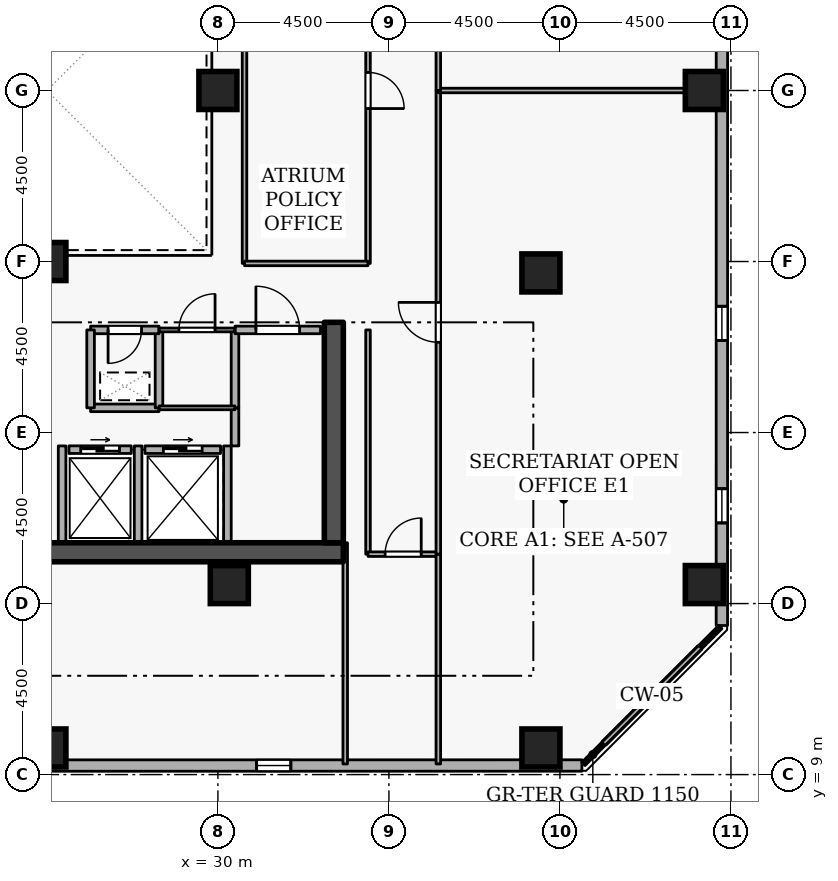
"""IFC4 building model, lengths in metres.
Left out: names, types, materials, properties, quantities, classifications, styles, units other than length and angle.
Written with IfcOpenShell. Run it as: python <this file> out.ifc"""

import sys

from ifc_helpers import new_model, si_unit, direction, frame, frame_2d, origin, origin_2d, place, context, subcontext, project, spatial, rectangle, extrude, element, fill, save


model = new_model("IFC4")
c1 = context("Model", 3, precision=1e-05, world=origin(), true_north=direction((0.0, 1.0)))
c2 = subcontext(c1, "Body", "Model", "MODEL_VIEW")
j1 = project(units=[si_unit("LENGTHUNIT", "METRE"), si_unit("PLANEANGLEUNIT", "RADIAN")], contexts=[c1])
p1 = place(None, origin())
s1 = spatial("IfcSite", under=j1, at=p1, CompositionType="ELEMENT")
p2 = place(p1, origin())
s2 = spatial("IfcBuilding", under=s1, at=p2, CompositionType="ELEMENT")
p3 = place(p2, frame((0.0, 0.0, 207.3)))
s3 = spatial("IfcBuildingStorey", under=s2, at=p3, CompositionType="ELEMENT", Elevation=207.3)
p4 = place(p3, frame((17.7, 14.85, 0.0), z_axis=(0.0, 0.0, 1.0), x_axis=(1.0, 0.0, 0.0)))
e1 = element("IfcWall", 1, at=p4, inside=s3, PredefinedType="SHEAR", context=c2, shape_type="SweptSolid", body=[
    extrude(rectangle(XDim=15.6, YDim=0.5, at=frame_2d((7.8, 0.0))), origin(), (0.0, 0.0, 1.0), 3.6),
])
p5 = place(p3, frame((33.05, 15.1, 0.0), z_axis=(0.0, 0.0, 1.0), x_axis=(0.0, 1.0, 0.0)))
e2 = element("IfcWall", 2, at=p5, inside=s3, PredefinedType="SHEAR", context=c2, shape_type="SweptSolid", body=[
    extrude(rectangle(XDim=5.8, YDim=0.5, at=frame_2d((2.9, 0.0))), origin(), (0.0, 0.0, 1.0), 3.6),
])
for number, where, z_axis, x_axis in (
    (3, (25.5, 9.7, 0.0), (0.0, 0.0, 1.0), (1.0, 0.0, 0.0)),
    (4, (38.5, 9.7, 0.0), (0.0, 0.0, 1.0), (1.0, 0.0, 0.0)),
    (5, (42.8, 14.0, 0.0), (0.0, 0.0, 1.0), (1.0, 0.0, 0.0)),
    (6, (42.8, 27.0, 0.0), (0.0, 0.0, 1.0), (1.0, 0.0, 0.0)),
    (7, (38.5, 22.2, 0.0), (0.0, 0.0, 1.0), (1.0, 0.0, 0.0)),
    (8, (30.3, 14.0, 0.0), (0.0, 0.0, 1.0), (1.0, 0.0, 0.0)),
    (9, (25.5, 22.5, 0.0), (0.0, 0.0, 1.0), (1.0, 0.0, 0.0)),
    (10, (30.0, 27.0, 0.0), (0.0, 0.0, 1.0), (1.0, 0.0, 0.0)),
):
    element("IfcColumn", number, at=place(p3, frame(where, z_axis=z_axis, x_axis=x_axis)), inside=s3, PredefinedType="COLUMN", context=c2, shape_type="SweptSolid", body=[
        extrude(rectangle(XDim=1.0, YDim=1.0, at=origin_2d()), origin(), (0.0, 0.0, 1.0), 3.6),
    ])
p6 = place(p3, frame((4.319, 9.235, 0.0), z_axis=(0.0, 0.0, 1.0), x_axis=(0.999999994606, 0.000103863011, 0.0)))
e11 = element("IfcWall", 11, at=p6, inside=s3, PredefinedType="STANDARD", context=c2, shape_type="SweptSolid", body=[
    extrude(rectangle(XDim=35.259, YDim=0.3, at=frame_2d((17.629, 0.0))), origin(), (0.0, 0.0, 1.0), 2.7),
])
p7 = place(p6, frame((2.7, 0.0, 0.72)))
e12 = element("IfcOpeningElement", 12, at=p7, cuts=e11, PredefinedType="OPENING", context=c2, shape_type="SweptSolid", body=[
    extrude(rectangle(XDim=0.9, YDim=1.75, at=frame_2d((0.45, 0.875))), frame((0.0, 0.16, 0.0), z_axis=(0.0, -1.0, 0.0), x_axis=(1.0, 0.0, 0.0)), (0.0, 0.0, 1.0), 0.32),
])
p8 = place(p6, frame((12.3, 0.0, 0.72)))
e13 = element("IfcOpeningElement", 13, at=p8, cuts=e11, PredefinedType="OPENING", context=c2, shape_type="SweptSolid", body=[
    extrude(rectangle(XDim=0.9, YDim=1.75, at=frame_2d((0.45, 0.875))), frame((0.0, 0.16, 0.0), z_axis=(0.0, -1.0, 0.0), x_axis=(1.0, 0.0, 0.0)), (0.0, 0.0, 1.0), 0.32),
])
p9 = place(p6, frame((17.1, 0.0, 0.72)))
e14 = element("IfcOpeningElement", 14, at=p9, cuts=e11, PredefinedType="OPENING", context=c2, shape_type="SweptSolid", body=[
    extrude(rectangle(XDim=0.9, YDim=1.75, at=frame_2d((0.45, 0.875))), frame((0.0, 0.16, 0.0), z_axis=(0.0, -1.0, 0.0), x_axis=(1.0, 0.0, 0.0)), (0.0, 0.0, 1.0), 0.32),
])
p10 = place(p6, frame((26.7, 0.0, 0.72)))
e15 = element("IfcOpeningElement", 15, at=p10, cuts=e11, PredefinedType="OPENING", context=c2, shape_type="SweptSolid", body=[
    extrude(rectangle(XDim=0.9, YDim=1.75, at=frame_2d((0.45, 0.875))), frame((0.0, 0.16, 0.0), z_axis=(0.0, -1.0, 0.0), x_axis=(1.0, 0.0, 0.0)), (0.0, 0.0, 1.0), 0.32),
])
p11 = place(p3, frame((43.261, 12.922, 0.0), z_axis=(0.0, 0.0, 1.0), x_axis=(0.000103863011, 0.999999994606, 0.0)))
e16 = element("IfcWall", 16, at=p11, inside=s3, PredefinedType="STANDARD", context=c2, shape_type="SweptSolid", body=[
    extrude(rectangle(XDim=35.259, YDim=0.3, at=frame_2d((17.629, 0.0))), origin(), (0.0, 0.0, 1.0), 2.7),
])
p12 = place(p11, frame((2.7, 0.0, 0.72)))
e17 = element("IfcOpeningElement", 17, at=p12, cuts=e16, PredefinedType="OPENING", context=c2, shape_type="SweptSolid", body=[
    extrude(rectangle(XDim=0.9, YDim=1.75, at=frame_2d((0.45, 0.875))), frame((0.0, 0.16, 0.0), z_axis=(0.0, -1.0, 0.0), x_axis=(1.0, 0.0, 0.0)), (0.0, 0.0, 1.0), 0.32),
])
p13 = place(p11, frame((7.5, 0.0, 0.72)))
e18 = element("IfcOpeningElement", 18, at=p13, cuts=e16, PredefinedType="OPENING", context=c2, shape_type="SweptSolid", body=[
    extrude(rectangle(XDim=0.9, YDim=1.75, at=frame_2d((0.45, 0.875))), frame((0.0, 0.16, 0.0), z_axis=(0.0, -1.0, 0.0), x_axis=(1.0, 0.0, 0.0)), (0.0, 0.0, 1.0), 0.32),
])
p14 = place(p11, frame((17.1, 0.0, 0.72)))
e19 = element("IfcOpeningElement", 19, at=p14, cuts=e16, PredefinedType="OPENING", context=c2, shape_type="SweptSolid", body=[
    extrude(rectangle(XDim=0.9, YDim=1.75, at=frame_2d((0.45, 0.875))), frame((0.0, 0.16, 0.0), z_axis=(0.0, -1.0, 0.0), x_axis=(1.0, 0.0, 0.0)), (0.0, 0.0, 1.0), 0.32),
])
p15 = place(p11, frame((21.9, 0.0, 0.72)))
e20 = element("IfcOpeningElement", 20, at=p15, cuts=e16, PredefinedType="OPENING", context=c2, shape_type="SweptSolid", body=[
    extrude(rectangle(XDim=0.9, YDim=1.75, at=frame_2d((0.45, 0.875))), frame((0.0, 0.16, 0.0), z_axis=(0.0, -1.0, 0.0), x_axis=(1.0, 0.0, 0.0)), (0.0, 0.0, 1.0), 0.32),
])
p16 = place(p11, frame((31.5, 0.0, 0.72)))
e21 = element("IfcOpeningElement", 21, at=p16, cuts=e16, PredefinedType="OPENING", context=c2, shape_type="SweptSolid", body=[
    extrude(rectangle(XDim=0.9, YDim=1.75, at=frame_2d((0.45, 0.875))), frame((0.0, 0.16, 0.0), z_axis=(0.0, -1.0, 0.0), x_axis=(1.0, 0.0, 0.0)), (0.0, 0.0, 1.0), 0.32),
])
p17 = place(p3, frame((26.08, 17.55, 0.0), z_axis=(0.0, 0.0, 1.0), x_axis=(1.0, 0.0, 0.0)))
e22 = element("IfcWall", 22, at=p17, inside=s3, PredefinedType="STANDARD", context=c2, shape_type="SweptSolid", body=[
    extrude(rectangle(XDim=1.64, YDim=0.2, at=frame_2d((0.82, 0.0))), origin(), (0.0, 0.0, 1.0), 3.34),
])
p18 = place(p17, frame((0.31, 0.0, 0.0)))
e23 = element("IfcOpeningElement", 23, at=p18, cuts=e22, PredefinedType="OPENING", context=c2, shape_type="SweptSolid", body=[
    extrude(rectangle(XDim=1.02, YDim=2.06, at=frame_2d((0.51, 1.03))), frame((0.0, 0.11, 0.0), z_axis=(0.0, -1.0, 0.0), x_axis=(1.0, 0.0, 0.0)), (0.0, 0.0, 1.0), 0.22),
])
p19 = place(p3, frame((28.08, 17.55, 0.0), z_axis=(0.0, 0.0, 1.0), x_axis=(1.0, 0.0, 0.0)))
e24 = element("IfcWall", 24, at=p19, inside=s3, PredefinedType="STANDARD", context=c2, shape_type="SweptSolid", body=[
    extrude(rectangle(XDim=1.99, YDim=0.2, at=frame_2d((0.995, 0.0))), origin(), (0.0, 0.0, 1.0), 3.34),
])
p20 = place(p19, frame((0.485, 0.0, 0.0)))
e25 = element("IfcOpeningElement", 25, at=p20, cuts=e24, PredefinedType="OPENING", context=c2, shape_type="SweptSolid", body=[
    extrude(rectangle(XDim=1.02, YDim=2.06, at=frame_2d((0.51, 1.03))), frame((0.0, 0.11, 0.0), z_axis=(0.0, -1.0, 0.0), x_axis=(1.0, 0.0, 0.0)), (0.0, 0.0, 1.0), 0.22),
])
for number, where, z_axis, x_axis in (
    (26, (27.9, 15.112, 0.0), (0.0, 0.0, 1.0), (0.0, 1.0, 0.0)),
    (27, (25.9, 15.112, 0.0), (0.0, 0.0, 1.0), (0.0, 1.0, 0.0)),
    (28, (30.25, 15.112, 0.0), (0.0, 0.0, 1.0), (0.0, 1.0, 0.0)),
):
    element("IfcWall", number, at=place(p3, frame(where, z_axis=z_axis, x_axis=x_axis)), inside=s3, PredefinedType="STANDARD", context=c2, shape_type="SweptSolid", body=[
        extrude(rectangle(XDim=2.536, YDim=0.2, at=frame_2d((1.268, 0.0))), origin(), (0.0, 0.0, 1.0), 3.34),
    ])
p21 = place(p3, frame((26.65, 18.65, 0.0), z_axis=(0.0, 0.0, 1.0), x_axis=(1.0, 0.0, 0.0)))
e29 = element("IfcWall", 29, at=p21, inside=s3, PredefinedType="STANDARD", context=c2, shape_type="SweptSolid", body=[
    extrude(rectangle(XDim=1.8, YDim=0.2, at=frame_2d((0.9, 0.0))), origin(), (0.0, 0.0, 1.0), 3.34),
])
p22 = place(p3, frame((28.45, 18.65, 0.0), z_axis=(0.0, 0.0, 1.0), x_axis=(0.0, 1.0, 0.0)))
e30 = element("IfcWall", 30, at=p22, inside=s3, PredefinedType="STANDARD", context=c2, shape_type="SweptSolid", body=[
    extrude(rectangle(XDim=2.05, YDim=0.2, at=frame_2d((1.025, 0.0))), origin(), (0.0, 0.0, 1.0), 3.34),
])
p23 = place(p3, frame((28.45, 20.7, 0.0), z_axis=(0.0, 0.0, 1.0), x_axis=(-1.0, 0.0, 0.0)))
e31 = element("IfcWall", 31, at=p23, inside=s3, PredefinedType="STANDARD", context=c2, shape_type="SweptSolid", body=[
    extrude(rectangle(XDim=1.8, YDim=0.2, at=frame_2d((0.9, 0.0))), origin(), (0.0, 0.0, 1.0), 3.34),
])
p24 = place(p23, frame((0.46, 0.0, 0.0)))
e32 = element("IfcOpeningElement", 32, at=p24, cuts=e31, PredefinedType="OPENING", context=c2, shape_type="SweptSolid", body=[
    extrude(rectangle(XDim=0.88, YDim=2.04, at=frame_2d((0.44, 1.02))), frame((0.0, 0.11, 0.0), z_axis=(0.0, -1.0, 0.0), x_axis=(1.0, 0.0, 0.0)), (0.0, 0.0, 1.0), 0.22),
])
p25 = place(p3, frame((26.65, 20.7, 0.0), z_axis=(0.0, 0.0, 1.0), x_axis=(0.0, -1.0, 0.0)))
e33 = element("IfcWall", 33, at=p25, inside=s3, PredefinedType="STANDARD", context=c2, shape_type="SweptSolid", body=[
    extrude(rectangle(XDim=2.05, YDim=0.2, at=frame_2d((1.025, 0.0))), origin(), (0.0, 0.0, 1.0), 3.34),
])
p26 = place(p3, frame((30.45, 17.648, 0.0), z_axis=(0.0, 0.0, 1.0), x_axis=(0.0, 1.0, 0.0)))
e34 = element("IfcWall", 34, at=p26, inside=s3, PredefinedType="STANDARD", context=c2, shape_type="SweptSolid", body=[
    extrude(rectangle(XDim=1.002, YDim=0.2, at=frame_2d((0.501, 0.0))), origin(), (0.0, 0.0, 1.0), 3.34),
])
p27 = place(p3, frame((30.45, 18.65, 0.0), z_axis=(0.0, 0.0, 1.0), x_axis=(0.0, 1.0, 0.0)))
e35 = element("IfcWall", 35, at=p27, inside=s3, PredefinedType="STANDARD", context=c2, shape_type="SweptSolid", body=[
    extrude(rectangle(XDim=2.05, YDim=0.2, at=frame_2d((1.025, 0.0))), origin(), (0.0, 0.0, 1.0), 3.34),
])
p28 = place(p3, frame((30.45, 20.7, 0.0), z_axis=(0.0, 0.0, 1.0), x_axis=(1.0, 0.0, 0.0)))
e36 = element("IfcWall", 36, at=p28, inside=s3, PredefinedType="STANDARD", context=c2, shape_type="SweptSolid", body=[
    extrude(rectangle(XDim=2.25, YDim=0.2, at=frame_2d((1.125, 0.0))), origin(), (0.0, 0.0, 1.0), 3.34),
])
p29 = place(p28, frame((0.55, 0.0, 0.0)))
e37 = element("IfcOpeningElement", 37, at=p29, cuts=e36, PredefinedType="OPENING", context=c2, shape_type="SweptSolid", body=[
    extrude(rectangle(XDim=1.15, YDim=2.1, at=frame_2d((0.575, 1.05))), frame((0.0, 0.11, 0.0), z_axis=(0.0, -1.0, 0.0), x_axis=(1.0, 0.0, 0.0)), (0.0, 0.0, 1.0), 0.22),
])
p30 = place(p3, frame((30.45, 18.65, 0.0), z_axis=(0.0, 0.0, 1.0), x_axis=(-1.0, 0.0, 0.0)))
e38 = element("IfcWall", 38, at=p30, inside=s3, PredefinedType="PARTITIONING", context=c2, shape_type="SweptSolid", body=[
    extrude(rectangle(XDim=2.0, YDim=0.1, at=frame_2d((1.0, 0.0))), origin(), (0.0, 0.0, 1.0), 3.34),
])
p31 = place(p3, frame((28.45, 20.7, 0.0), z_axis=(0.0, 0.0, 1.0), x_axis=(1.0, 0.0, 0.0)))
e39 = element("IfcWall", 39, at=p31, inside=s3, PredefinedType="PARTITIONING", context=c2, shape_type="SweptSolid", body=[
    extrude(rectangle(XDim=2.0, YDim=0.1, at=frame_2d((1.0, 0.0))), origin(), (0.0, 0.0, 1.0), 3.34),
])
p32 = place(p31, frame((0.525, 0.0, 0.0)))
e40 = element("IfcOpeningElement", 40, at=p32, cuts=e39, PredefinedType="OPENING", context=c2, shape_type="SweptSolid", body=[
    extrude(rectangle(XDim=0.95, YDim=2.1, at=frame_2d((0.475, 1.05))), frame((0.0, 0.06, 0.0), z_axis=(0.0, -1.0, 0.0), x_axis=(1.0, 0.0, 0.0)), (0.0, 0.0, 1.0), 0.12),
])
p33 = place(p3, frame((33.95, 20.7, 0.0), z_axis=(0.0, 0.0, 1.0), x_axis=(0.0, -1.0, 0.0)))
e41 = element("IfcWall", 41, at=p33, inside=s3, PredefinedType="PARTITIONING", context=c2, shape_type="SweptSolid", body=[
    extrude(rectangle(XDim=5.9, YDim=0.12, at=frame_2d((2.95, 0.0))), origin(), (0.0, 0.0, 1.0), 3.34),
])
p34 = place(p3, frame((33.95, 14.8, 0.0), z_axis=(0.0, 0.0, 1.0), x_axis=(1.0, 0.0, 0.0)))
e42 = element("IfcWall", 42, at=p34, inside=s3, PredefinedType="PARTITIONING", context=c2, shape_type="SweptSolid", body=[
    extrude(rectangle(XDim=1.85, YDim=0.12, at=frame_2d((0.925, 0.0))), origin(), (0.0, 0.0, 1.0), 3.34),
])
p35 = place(p34, frame((0.45, 0.0, 0.0)))
e43 = element("IfcOpeningElement", 43, at=p35, cuts=e42, PredefinedType="OPENING", context=c2, shape_type="SweptSolid", body=[
    extrude(rectangle(XDim=0.95, YDim=2.1, at=frame_2d((0.475, 1.05))), frame((0.0, 0.07, 0.0), z_axis=(0.0, -1.0, 0.0), x_axis=(1.0, 0.0, 0.0)), (0.0, 0.0, 1.0), 0.14),
])
p36 = place(p3, frame((35.8, 14.8, 0.0), z_axis=(0.0, 0.0, 1.0), x_axis=(0.0, -1.0, 0.0)))
e44 = element("IfcWall", 44, at=p36, inside=s3, PredefinedType="PARTITIONING", context=c2, shape_type="SweptSolid", body=[
    extrude(rectangle(XDim=5.52, YDim=0.12, at=frame_2d((2.76, 0.0))), origin(), (0.0, 0.0, 1.0), 3.34),
])
p37 = place(p3, frame((33.35, 9.28, 0.0), z_axis=(0.0, 0.0, 1.0), x_axis=(0.0, 1.0, 0.0)))
e45 = element("IfcWall", 45, at=p37, inside=s3, PredefinedType="PARTITIONING", context=c2, shape_type="SweptSolid", body=[
    extrude(rectangle(XDim=5.82, YDim=0.12, at=frame_2d((2.91, 0.0))), origin(), (0.0, 0.0, 1.0), 2.545),
])
p38 = place(p3, frame((35.8, 14.8, 0.0), z_axis=(0.0, 0.0, 1.0), x_axis=(0.0, 1.0, 0.0)))
e46 = element("IfcWall", 46, at=p38, inside=s3, PredefinedType="PARTITIONING", context=c2, shape_type="SweptSolid", body=[
    extrude(rectangle(XDim=12.2, YDim=0.12, at=frame_2d((6.1, 0.0))), origin(), (0.0, 0.0, 1.0), 3.34),
])
p39 = place(p38, frame((5.575, 0.0, 0.0)))
e47 = element("IfcOpeningElement", 47, at=p39, cuts=e46, PredefinedType="OPENING", context=c2, shape_type="SweptSolid", body=[
    extrude(rectangle(XDim=1.05, YDim=2.1, at=frame_2d((0.525, 1.05))), frame((0.0, 0.07, 0.0), z_axis=(0.0, -1.0, 0.0), x_axis=(1.0, 0.0, 0.0)), (0.0, 0.0, 1.0), 0.14),
])
p40 = place(p3, frame((35.8, 27.0, 0.0), z_axis=(0.0, 0.0, 1.0), x_axis=(1.0, 0.0, 0.0)))
e48 = element("IfcWall", 48, at=p40, inside=s3, PredefinedType="PARTITIONING", context=c2, shape_type="SweptSolid", body=[
    extrude(rectangle(XDim=7.42, YDim=0.12, at=frame_2d((3.71, 0.0))), origin(), (0.0, 0.0, 1.0), 2.932),
])
p41 = place(p3, frame((43.22, 12.883, 0.0), z_axis=(0.0, 0.0, 1.0), x_axis=(-0.707106781187, -0.707106781187, 0.0)))
e49 = element("IfcWall", 49, at=p41, inside=s3, PredefinedType="PARTITIONING", context=c2, shape_type="SweptSolid", body=[
    extrude(rectangle(XDim=5.095, YDim=0.12, at=frame_2d((2.547, 0.0))), origin(), (0.0, 0.0, 1.0), 3.34),
])
p42 = place(p3, frame((35.8, 27.0, 0.0), z_axis=(0.0, 0.0, 1.0), x_axis=(0.0, 1.0, 0.0)))
e50 = element("IfcWall", 50, at=p42, inside=s3, PredefinedType="PARTITIONING", context=c2, shape_type="SweptSolid", body=[
    extrude(rectangle(XDim=6.3, YDim=0.12, at=frame_2d((3.15, 0.0))), origin(), (0.0, 0.0, 1.0), 3.34),
])
p43 = place(p42, frame((2.625, 0.0, 0.0)))
e51 = element("IfcOpeningElement", 51, at=p43, cuts=e50, PredefinedType="OPENING", context=c2, shape_type="SweptSolid", body=[
    extrude(rectangle(XDim=1.05, YDim=2.1, at=frame_2d((0.525, 1.05))), frame((0.0, 0.07, 0.0), z_axis=(0.0, -1.0, 0.0), x_axis=(1.0, 0.0, 0.0)), (0.0, 0.0, 1.0), 0.14),
])
p44 = place(p3, frame((30.7, 22.45, 0.0), z_axis=(0.0, 0.0, 1.0), x_axis=(0.0, 1.0, 0.0)))
e52 = element("IfcWall", 52, at=p44, inside=s3, PredefinedType="PARTITIONING", context=c2, shape_type="SweptSolid", body=[
    extrude(rectangle(XDim=9.1, YDim=0.12, at=frame_2d((4.55, 0.0))), origin(), (0.0, 0.0, 1.0), 3.34),
])
p45 = place(p3, frame((33.95, 31.55, 0.0), z_axis=(0.0, 0.0, 1.0), x_axis=(0.0, -1.0, 0.0)))
e53 = element("IfcWall", 53, at=p45, inside=s3, PredefinedType="PARTITIONING", context=c2, shape_type="SweptSolid", body=[
    extrude(rectangle(XDim=9.1, YDim=0.12, at=frame_2d((4.55, 0.0))), origin(), (0.0, 0.0, 1.0), 3.34),
])
p46 = place(p45, frame((4.075, 0.0, 0.0)))
e54 = element("IfcOpeningElement", 54, at=p46, cuts=e53, PredefinedType="OPENING", context=c2, shape_type="SweptSolid", body=[
    extrude(rectangle(XDim=0.95, YDim=2.1, at=frame_2d((0.475, 1.05))), frame((0.0, 0.07, 0.0), z_axis=(0.0, -1.0, 0.0), x_axis=(1.0, 0.0, 0.0)), (0.0, 0.0, 1.0), 0.14),
])
p47 = place(p3, frame((33.95, 22.45, 0.0), z_axis=(0.0, 0.0, 1.0), x_axis=(-1.0, 0.0, 0.0)))
e55 = element("IfcWall", 55, at=p47, inside=s3, PredefinedType="PARTITIONING", context=c2, shape_type="SweptSolid", body=[
    extrude(rectangle(XDim=3.25, YDim=0.12, at=frame_2d((1.625, 0.0))), origin(), (0.0, 0.0, 1.0), 3.34),
])
p48 = place(p10, origin())
e56 = element("IfcWindow", 56, at=p48, inside=s3, PartitioningType="SINGLE_PANEL", PredefinedType="WINDOW", context=c2, shape_type="SweptSolid", body=[
    extrude(rectangle(XDim=0.9, YDim=1.75, at=frame_2d((0.45, 0.875))), frame((0.0, 0.03, 0.0), z_axis=(0.0, -1.0, 0.0), x_axis=(1.0, 0.0, 0.0)), (0.0, 0.0, 1.0), 0.06),
])
fill(e15, e56)
p49 = place(p12, origin())
e57 = element("IfcWindow", 57, at=p49, inside=s3, PartitioningType="SINGLE_PANEL", PredefinedType="WINDOW", context=c2, shape_type="SweptSolid", body=[
    extrude(rectangle(XDim=0.9, YDim=1.75, at=frame_2d((0.45, 0.875))), frame((0.0, 0.03, 0.0), z_axis=(0.0, -1.0, 0.0), x_axis=(1.0, 0.0, 0.0)), (0.0, 0.0, 1.0), 0.06),
])
fill(e17, e57)
p50 = place(p13, origin())
e58 = element("IfcWindow", 58, at=p50, inside=s3, PartitioningType="SINGLE_PANEL", PredefinedType="WINDOW", context=c2, shape_type="SweptSolid", body=[
    extrude(rectangle(XDim=0.9, YDim=1.75, at=frame_2d((0.45, 0.875))), frame((0.0, 0.03, 0.0), z_axis=(0.0, -1.0, 0.0), x_axis=(1.0, 0.0, 0.0)), (0.0, 0.0, 1.0), 0.06),
])
fill(e18, e58)
p51 = place(p18, origin())
e59 = element("IfcDoor", 59, at=p51, inside=s3, OperationType="SLIDING_TO_LEFT", PredefinedType="DOOR", context=c2, shape_type="SweptSolid", body=[
    extrude(rectangle(XDim=1.02, YDim=2.06, at=frame_2d((0.51, 1.03))), frame((0.0, 0.025, 0.0), z_axis=(0.0, -1.0, 0.0), x_axis=(1.0, 0.0, 0.0)), (0.0, 0.0, 1.0), 0.05),
])
fill(e23, e59)
p52 = place(p20, origin())
e60 = element("IfcDoor", 60, at=p52, inside=s3, OperationType="SLIDING_TO_LEFT", PredefinedType="DOOR", context=c2, shape_type="SweptSolid", body=[
    extrude(rectangle(XDim=1.02, YDim=2.06, at=frame_2d((0.51, 1.03))), frame((0.0, 0.025, 0.0), z_axis=(0.0, -1.0, 0.0), x_axis=(1.0, 0.0, 0.0)), (0.0, 0.0, 1.0), 0.05),
])
fill(e25, e60)
p53 = place(p24, origin())
e61 = element("IfcDoor", 61, at=p53, inside=s3, OperationType="SINGLE_SWING_RIGHT", PredefinedType="DOOR", context=c2, shape_type="SweptSolid", body=[
    extrude(rectangle(XDim=0.88, YDim=2.04, at=frame_2d((0.44, 1.02))), frame((0.0, 0.025, 0.0), z_axis=(0.0, -1.0, 0.0), x_axis=(1.0, 0.0, 0.0)), (0.0, 0.0, 1.0), 0.05),
])
fill(e32, e61)
p54 = place(p32, origin())
e62 = element("IfcDoor", 62, at=p54, inside=s3, OperationType="SINGLE_SWING_RIGHT", PredefinedType="DOOR", context=c2, shape_type="SweptSolid", body=[
    extrude(rectangle(XDim=0.95, YDim=2.1, at=frame_2d((0.475, 1.05))), frame((0.0, 0.025, 0.0), z_axis=(0.0, -1.0, 0.0), x_axis=(1.0, 0.0, 0.0)), (0.0, 0.0, 1.0), 0.05),
])
fill(e40, e62)
p55 = place(p29, origin())
e63 = element("IfcDoor", 63, at=p55, inside=s3, OperationType="SINGLE_SWING_LEFT", PredefinedType="DOOR", context=c2, shape_type="SweptSolid", body=[
    extrude(rectangle(XDim=1.15, YDim=2.1, at=frame_2d((0.575, 1.05))), frame((0.0, 0.025, 0.0), z_axis=(0.0, -1.0, 0.0), x_axis=(1.0, 0.0, 0.0)), (0.0, 0.0, 1.0), 0.05),
])
fill(e37, e63)
p56 = place(p35, origin())
e64 = element("IfcDoor", 64, at=p56, inside=s3, OperationType="SINGLE_SWING_RIGHT", PredefinedType="DOOR", context=c2, shape_type="SweptSolid", body=[
    extrude(rectangle(XDim=0.95, YDim=2.1, at=frame_2d((0.475, 1.05))), frame((0.0, 0.025, 0.0), z_axis=(0.0, -1.0, 0.0), x_axis=(1.0, 0.0, 0.0)), (0.0, 0.0, 1.0), 0.05),
])
fill(e43, e64)
p57 = place(p39, origin())
e65 = element("IfcDoor", 65, at=p57, inside=s3, OperationType="SINGLE_SWING_RIGHT", PredefinedType="DOOR", context=c2, shape_type="SweptSolid", body=[
    extrude(rectangle(XDim=1.05, YDim=2.1, at=frame_2d((0.525, 1.05))), frame((0.0, 0.025, 0.0), z_axis=(0.0, -1.0, 0.0), x_axis=(1.0, 0.0, 0.0)), (0.0, 0.0, 1.0), 0.05),
])
fill(e47, e65)
p58 = place(p46, origin())
e66 = element("IfcDoor", 66, at=p58, inside=s3, OperationType="SINGLE_SWING_RIGHT", PredefinedType="DOOR", context=c2, shape_type="SweptSolid", body=[
    extrude(rectangle(XDim=0.95, YDim=2.1, at=frame_2d((0.475, 1.05))), frame((0.0, 0.025, 0.0), z_axis=(0.0, -1.0, 0.0), x_axis=(1.0, 0.0, 0.0)), (0.0, 0.0, 1.0), 0.05),
])
fill(e54, e66)
save(model, sys.argv[1])
